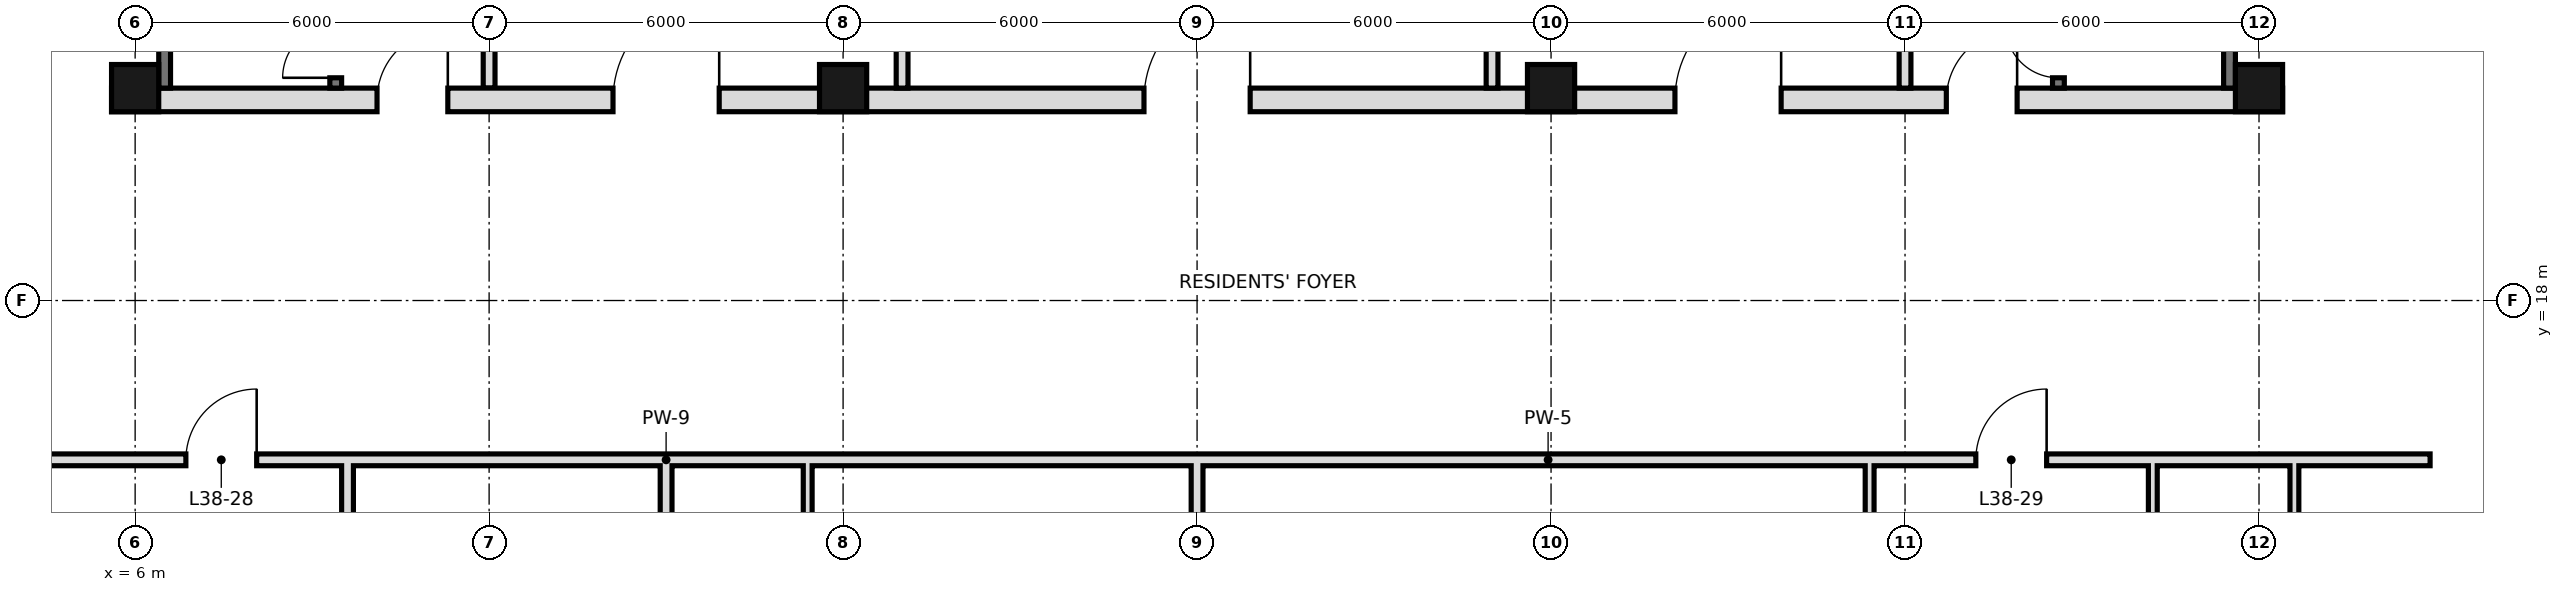
"""IFC4 building model, lengths in metres.
Left out: names, types, materials, properties, quantities, classifications, styles, units other than length and angle.
Written with IfcOpenShell. Run it as: python <this file> out.ifc"""

import sys

from ifc_helpers import new_model, si_unit, direction, frame, frame_2d, origin, origin_2d, place, context, subcontext, project, spatial, rectangle, hollow_rectangle, extrude, element, fill, save


model = new_model("IFC4")
c1 = context("Model", 3, precision=1e-05, world=origin(), true_north=direction((0.0, 1.0)))
c2 = subcontext(c1, "Body", "Model", "MODEL_VIEW")
j1 = project(units=[si_unit("LENGTHUNIT", "METRE"), si_unit("PLANEANGLEUNIT", "RADIAN")], contexts=[c1])
p1 = place(None, origin())
s1 = spatial("IfcSite", under=j1, at=p1, CompositionType="ELEMENT")
p2 = place(p1, origin())
s2 = spatial("IfcBuilding", under=s1, at=p2, CompositionType="ELEMENT")
p3 = place(p2, frame((0.0, 0.0, 167.2)))
s3 = spatial("IfcBuildingStorey", under=s2, at=p3, CompositionType="ELEMENT", Elevation=167.2)
for number, where, z_axis, x_axis in (
    (1, (6.0, 21.6, 0.0), (0.0, 0.0, 1.0), (1.0, 0.0, 0.0)),
    (2, (18.0, 21.6, 0.0), (0.0, 0.0, 1.0), (1.0, 0.0, 0.0)),
    (3, (30.0, 21.6, 0.0), (0.0, 0.0, 1.0), (1.0, 0.0, 0.0)),
    (4, (42.0, 21.6, 0.0), (0.0, 0.0, 1.0), (1.0, 0.0, 0.0)),
):
    element("IfcColumn", number, at=place(p3, frame(where, z_axis=z_axis, x_axis=x_axis)), inside=s3, PredefinedType="COLUMN", context=c2, shape_type="SweptSolid", body=[
        extrude(hollow_rectangle(XDim=0.8, YDim=0.8, WallThickness=0.045, at=origin_2d()), origin(), (0.0, 0.0, 1.0), 3.6),
    ])
p4 = place(p3, frame((15.0, 10.8, 0.0), z_axis=(0.0, 0.0, 1.0), x_axis=(0.0, 1.0, 0.0)))
e5 = element("IfcWall", 5, at=p4, inside=s3, PredefinedType="SOLIDWALL", context=c2, shape_type="SweptSolid", body=[
    extrude(rectangle(XDim=4.5, YDim=0.2, at=frame_2d((2.25, 0.0))), origin(), (0.0, 0.0, 1.0), 2.72),
])
p5 = place(p3, frame((17.4, 10.8, 0.0), z_axis=(0.0, 0.0, 1.0), x_axis=(0.0, 1.0, 0.0)))
e6 = element("IfcWall", 6, at=p5, inside=s3, PredefinedType="PARTITIONING", context=c2, shape_type="SweptSolid", body=[
    extrude(rectangle(XDim=4.5, YDim=0.15, at=frame_2d((2.25, 0.0))), origin(), (0.0, 0.0, 1.0), 3.42),
])
p6 = place(p3, frame((24.0, 0.0, 0.0), z_axis=(0.0, 0.0, 1.0), x_axis=(0.0, 1.0, 0.0)))
e7 = element("IfcWall", 7, at=p6, inside=s3, PredefinedType="SOLIDWALL", context=c2, shape_type="SweptSolid", body=[
    extrude(rectangle(XDim=15.3, YDim=0.2, at=frame_2d((7.65, 0.0))), origin(), (0.0, 0.0, 1.0), 2.72),
])
for number, where, z_axis, x_axis in (
    (8, (35.4, 10.8, 0.0), (0.0, 0.0, 1.0), (0.0, 1.0, 0.0)),
    (9, (40.2, 10.8, 0.0), (0.0, 0.0, 1.0), (0.0, 1.0, 0.0)),
    (10, (42.6, 10.8, 0.0), (0.0, 0.0, 1.0), (0.0, 1.0, 0.0)),
):
    element("IfcWall", number, at=place(p3, frame(where, z_axis=z_axis, x_axis=x_axis)), inside=s3, PredefinedType="PARTITIONING", context=c2, shape_type="SweptSolid", body=[
        extrude(rectangle(XDim=4.5, YDim=0.15, at=frame_2d((2.25, 0.0))), origin(), (0.0, 0.0, 1.0), 3.42),
    ])
p7 = place(p3, frame((9.6, 10.8, 0.0), z_axis=(0.0, 0.0, 1.0), x_axis=(0.0, 1.0, 0.0)))
e11 = element("IfcWall", 11, at=p7, inside=s3, PredefinedType="SOLIDWALL", context=c2, shape_type="SweptSolid", body=[
    extrude(rectangle(XDim=4.5, YDim=0.2, at=frame_2d((2.25, 0.0))), origin(), (0.0, 0.0, 1.0), 2.72),
])
p8 = place(p3, frame((3.1, 15.3, 0.0), z_axis=(0.0, 0.0, 1.0), x_axis=(1.0, 0.0, 0.0)))
e12 = element("IfcWall", 12, at=p8, inside=s3, PredefinedType="SOLIDWALL", context=c2, shape_type="SweptSolid", body=[
    extrude(rectangle(XDim=6.5, YDim=0.2, at=frame_2d((3.25, 0.0))), origin(), (0.0, 0.0, 1.0), 2.72),
])
p9 = place(p8, frame((3.76, 0.0, 0.0)))
e13 = element("IfcOpeningElement", 13, at=p9, cuts=e12, PredefinedType="OPENING", context=c2, shape_type="SweptSolid", body=[
    extrude(rectangle(XDim=1.2, YDim=2.4, at=frame_2d((0.6, 1.2))), frame((0.0, 0.11, 0.0), z_axis=(0.0, -1.0, 0.0), x_axis=(1.0, 0.0, 0.0)), (0.0, 0.0, 1.0), 0.22),
])
p10 = place(p3, frame((15.0, 15.3, 0.0), z_axis=(0.0, 0.0, 1.0), x_axis=(1.0, 0.0, 0.0)))
e14 = element("IfcWall", 14, at=p10, inside=s3, PredefinedType="SOLIDWALL", context=c2, shape_type="SweptSolid", body=[
    extrude(rectangle(XDim=29.9, YDim=0.2, at=frame_2d((14.95, 0.0))), origin(), (0.0, 0.0, 1.0), 2.72),
])
p11 = place(p10, frame((22.2, 0.0, 0.0)))
e15 = element("IfcOpeningElement", 15, at=p11, cuts=e14, PredefinedType="OPENING", context=c2, shape_type="SweptSolid", body=[
    extrude(rectangle(XDim=1.2, YDim=2.4, at=frame_2d((0.6, 1.2))), frame((0.0, 0.11, 0.0), z_axis=(0.0, -1.0, 0.0), x_axis=(1.0, 0.0, 0.0)), (0.0, 0.0, 1.0), 0.22),
])
p12 = place(p3, frame((9.6, 15.3, 0.0), z_axis=(0.0, 0.0, 1.0), x_axis=(1.0, 0.0, 0.0)))
e16 = element("IfcWall", 16, at=p12, inside=s3, PredefinedType="SOLIDWALL", context=c2, shape_type="SweptSolid", body=[
    extrude(rectangle(XDim=5.4, YDim=0.2, at=frame_2d((2.7, 0.0))), origin(), (0.0, 0.0, 1.0), 3.42),
])
for number, where, z_axis, x_axis in (
    (17, (6.5, 21.6, 0.0), (0.0, 0.0, 1.0), (0.0, 1.0, 0.0)),
    (18, (41.5, 21.6, 0.0), (0.0, 0.0, 1.0), (0.0, 1.0, 0.0)),
):
    element("IfcWall", number, at=place(p3, frame(where, z_axis=z_axis, x_axis=x_axis)), inside=s3, PredefinedType="SOLIDWALL", context=c2, shape_type="SweptSolid", body=[
        extrude(rectangle(XDim=23.5, YDim=0.2, at=frame_2d((11.75, 0.0))), origin(), (0.0, 0.0, 1.0), 3.42),
    ])
p13 = place(p3, frame((5.6, 21.4, 0.0), z_axis=(0.0, 0.0, 1.0), x_axis=(1.0, 0.0, 0.0)))
e19 = element("IfcWall", 19, at=p13, inside=s3, PredefinedType="SOLIDWALL", context=c2, shape_type="SweptSolid", body=[
    extrude(rectangle(XDim=36.8, YDim=0.4, at=frame_2d((18.4, 0.0))), origin(), (0.0, 0.0, 1.0), 3.42),
])
p14 = place(p13, frame((8.5, 0.0, 0.0)))
e20 = element("IfcOpeningElement", 20, at=p14, cuts=e19, PredefinedType="OPENING", context=c2, shape_type="SweptSolid", body=[
    extrude(rectangle(XDim=1.8, YDim=2.1, at=frame_2d((0.9, 1.05))), frame((0.0, 0.21, 0.0), z_axis=(0.0, -1.0, 0.0), x_axis=(1.0, 0.0, 0.0)), (0.0, 0.0, 1.0), 0.42),
])
p15 = place(p13, frame((17.5, 0.0, 0.0)))
e21 = element("IfcOpeningElement", 21, at=p15, cuts=e19, PredefinedType="OPENING", context=c2, shape_type="SweptSolid", body=[
    extrude(rectangle(XDim=1.8, YDim=2.1, at=frame_2d((0.9, 1.05))), frame((0.0, 0.21, 0.0), z_axis=(0.0, -1.0, 0.0), x_axis=(1.0, 0.0, 0.0)), (0.0, 0.0, 1.0), 0.42),
])
p16 = place(p13, frame((26.5, 0.0, 0.0)))
e22 = element("IfcOpeningElement", 22, at=p16, cuts=e19, PredefinedType="OPENING", context=c2, shape_type="SweptSolid", body=[
    extrude(rectangle(XDim=1.8, YDim=2.1, at=frame_2d((0.9, 1.05))), frame((0.0, 0.21, 0.0), z_axis=(0.0, -1.0, 0.0), x_axis=(1.0, 0.0, 0.0)), (0.0, 0.0, 1.0), 0.42),
])
p17 = place(p13, frame((4.5, 0.0, 0.0)))
e23 = element("IfcOpeningElement", 23, at=p17, cuts=e19, PredefinedType="OPENING", context=c2, shape_type="SweptSolid", body=[
    extrude(rectangle(XDim=1.2, YDim=2.1, at=frame_2d((0.6, 1.05))), frame((0.0, 0.21, 0.0), z_axis=(0.0, -1.0, 0.0), x_axis=(1.0, 0.0, 0.0)), (0.0, 0.0, 1.0), 0.42),
])
p18 = place(p13, frame((31.1, 0.0, 0.0)))
e24 = element("IfcOpeningElement", 24, at=p18, cuts=e19, PredefinedType="OPENING", context=c2, shape_type="SweptSolid", body=[
    extrude(rectangle(XDim=1.2, YDim=2.1, at=frame_2d((0.6, 1.05))), frame((0.0, 0.21, 0.0), z_axis=(0.0, -1.0, 0.0), x_axis=(1.0, 0.0, 0.0)), (0.0, 0.0, 1.0), 0.42),
])
p19 = place(p3, frame((19.0, 21.6, 0.0), z_axis=(0.0, 0.0, 1.0), x_axis=(0.0, 1.0, 0.0)))
e25 = element("IfcWall", 25, at=p19, inside=s3, PredefinedType="PARTITIONING", context=c2, shape_type="SweptSolid", body=[
    extrude(rectangle(XDim=6.0, YDim=0.2, at=frame_2d((3.0, 0.0))), origin(), (0.0, 0.0, 1.0), 3.42),
])
p20 = place(p19, frame((2.1, 0.0, 0.0)))
e26 = element("IfcOpeningElement", 26, at=p20, cuts=e25, PredefinedType="OPENING", context=c2, shape_type="SweptSolid", body=[
    extrude(rectangle(XDim=1.8, YDim=2.1, at=frame_2d((0.9, 1.05))), frame((0.0, 0.11, 0.0), z_axis=(0.0, -1.0, 0.0), x_axis=(1.0, 0.0, 0.0)), (0.0, 0.0, 1.0), 0.22),
])
p21 = place(p3, frame((29.0, 21.6, 0.0), z_axis=(0.0, 0.0, 1.0), x_axis=(0.0, 1.0, 0.0)))
e27 = element("IfcWall", 27, at=p21, inside=s3, PredefinedType="PARTITIONING", context=c2, shape_type="SweptSolid", body=[
    extrude(rectangle(XDim=6.0, YDim=0.2, at=frame_2d((3.0, 0.0))), origin(), (0.0, 0.0, 1.0), 3.42),
])
p22 = place(p21, frame((2.1, 0.0, 0.0)))
e28 = element("IfcOpeningElement", 28, at=p22, cuts=e27, PredefinedType="OPENING", context=c2, shape_type="SweptSolid", body=[
    extrude(rectangle(XDim=1.8, YDim=2.1, at=frame_2d((0.9, 1.05))), frame((0.0, 0.11, 0.0), z_axis=(0.0, -1.0, 0.0), x_axis=(1.0, 0.0, 0.0)), (0.0, 0.0, 1.0), 0.22),
])
for number, where, z_axis, x_axis in (
    (29, (12.0, 21.6, 0.0), (0.0, 0.0, 1.0), (0.0, 1.0, 0.0)),
    (30, (36.0, 21.6, 0.0), (0.0, 0.0, 1.0), (0.0, 1.0, 0.0)),
):
    element("IfcWall", number, at=place(p3, frame(where, z_axis=z_axis, x_axis=x_axis)), inside=s3, PredefinedType="PARTITIONING", context=c2, shape_type="SweptSolid", body=[
        extrude(rectangle(XDim=6.1, YDim=0.2, at=frame_2d((3.05, 0.0))), origin(), (0.0, 0.0, 1.0), 3.42),
    ])
p23 = place(p3, frame((38.6, 21.6, 0.0), z_axis=(0.0, 0.0, 1.0), x_axis=(0.0, 1.0, 0.0)))
e31 = element("IfcWall", 31, at=p23, inside=s3, PredefinedType="SOLIDWALL", context=c2, shape_type="SweptSolid", body=[
    extrude(rectangle(XDim=23.4, YDim=0.2, at=frame_2d((11.7, 0.0))), origin(), (0.0, 0.0, 1.0), 3.42),
])
p24 = place(p23, frame((7.0, 0.0, 0.0)))
e32 = element("IfcOpeningElement", 32, at=p24, cuts=e31, PredefinedType="OPENING", context=c2, shape_type="SweptSolid", body=[
    extrude(rectangle(XDim=1.1, YDim=2.1, at=frame_2d((0.55, 1.05))), frame((0.0, 0.11, 0.0), z_axis=(0.0, -1.0, 0.0), x_axis=(1.0, 0.0, 0.0)), (0.0, 0.0, 1.0), 0.22),
])
p25 = place(p23, frame((10.1, 0.0, 0.0)))
e33 = element("IfcOpeningElement", 33, at=p25, cuts=e31, PredefinedType="OPENING", context=c2, shape_type="SweptSolid", body=[
    extrude(rectangle(XDim=1.1, YDim=2.1, at=frame_2d((0.55, 1.05))), frame((0.0, 0.11, 0.0), z_axis=(0.0, -1.0, 0.0), x_axis=(1.0, 0.0, 0.0)), (0.0, 0.0, 1.0), 0.22),
])
p26 = place(p23, frame((13.2, 0.0, 0.0)))
e34 = element("IfcOpeningElement", 34, at=p26, cuts=e31, PredefinedType="OPENING", context=c2, shape_type="SweptSolid", body=[
    extrude(rectangle(XDim=1.1, YDim=2.1, at=frame_2d((0.55, 1.05))), frame((0.0, 0.11, 0.0), z_axis=(0.0, -1.0, 0.0), x_axis=(1.0, 0.0, 0.0)), (0.0, 0.0, 1.0), 0.22),
])
p27 = place(p23, frame((15.7, 0.0, 0.0)))
e35 = element("IfcOpeningElement", 35, at=p27, cuts=e31, PredefinedType="OPENING", context=c2, shape_type="SweptSolid", body=[
    extrude(rectangle(XDim=1.0, YDim=2.1, at=frame_2d((0.5, 1.05))), frame((0.0, 0.11, 0.0), z_axis=(0.0, -1.0, 0.0), x_axis=(1.0, 0.0, 0.0)), (0.0, 0.0, 1.0), 0.22),
])
p28 = place(p23, frame((0.175, 0.0, 0.0)))
e36 = element("IfcOpeningElement", 36, at=p28, cuts=e31, PredefinedType="OPENING", context=c2, shape_type="SweptSolid", body=[
    extrude(rectangle(XDim=0.9, YDim=2.1, at=frame_2d((0.45, 1.05))), frame((0.0, 0.11, 0.0), z_axis=(0.0, -1.0, 0.0), x_axis=(1.0, 0.0, 0.0)), (0.0, 0.0, 1.0), 0.22),
])
p29 = place(p3, frame((9.4, 21.6, 0.0), z_axis=(0.0, 0.0, 1.0), x_axis=(0.0, 1.0, 0.0)))
e37 = element("IfcWall", 37, at=p29, inside=s3, PredefinedType="SOLIDWALL", context=c2, shape_type="SweptSolid", body=[
    extrude(rectangle(XDim=23.4, YDim=0.2, at=frame_2d((11.7, 0.0))), origin(), (0.0, 0.0, 1.0), 3.42),
])
p30 = place(p29, frame((15.7, 0.0, 0.0)))
e38 = element("IfcOpeningElement", 38, at=p30, cuts=e37, PredefinedType="OPENING", context=c2, shape_type="SweptSolid", body=[
    extrude(rectangle(XDim=1.0, YDim=2.1, at=frame_2d((0.5, 1.05))), frame((0.0, 0.11, 0.0), z_axis=(0.0, -1.0, 0.0), x_axis=(1.0, 0.0, 0.0)), (0.0, 0.0, 1.0), 0.22),
])
p31 = place(p29, frame((0.175, 0.0, 0.0)))
e39 = element("IfcOpeningElement", 39, at=p31, cuts=e37, PredefinedType="OPENING", context=c2, shape_type="SweptSolid", body=[
    extrude(rectangle(XDim=0.9, YDim=2.1, at=frame_2d((0.45, 1.05))), frame((0.0, 0.11, 0.0), z_axis=(0.0, -1.0, 0.0), x_axis=(1.0, 0.0, 0.0)), (0.0, 0.0, 1.0), 0.22),
])
p32 = place(p9, frame((1.2, 0.0, 0.0), z_axis=(0.0, 0.0, 1.0), x_axis=(-1.0, 0.0, 0.0)))
e40 = element("IfcDoor", 40, at=p32, inside=s3, OperationType="SINGLE_SWING_LEFT", PredefinedType="DOOR", context=c2, shape_type="SweptSolid", body=[
    extrude(rectangle(XDim=1.2, YDim=2.4, at=frame_2d((0.6, 1.2))), frame((0.0, 0.025, 0.0), z_axis=(0.0, -1.0, 0.0), x_axis=(1.0, 0.0, 0.0)), (0.0, 0.0, 1.0), 0.05),
])
fill(e13, e40)
p33 = place(p11, frame((1.2, 0.0, 0.0), z_axis=(0.0, 0.0, 1.0), x_axis=(-1.0, 0.0, 0.0)))
e41 = element("IfcDoor", 41, at=p33, inside=s3, OperationType="SINGLE_SWING_LEFT", PredefinedType="DOOR", context=c2, shape_type="SweptSolid", body=[
    extrude(rectangle(XDim=1.2, YDim=2.4, at=frame_2d((0.6, 1.2))), frame((0.0, 0.025, 0.0), z_axis=(0.0, -1.0, 0.0), x_axis=(1.0, 0.0, 0.0)), (0.0, 0.0, 1.0), 0.05),
])
fill(e15, e41)
p34 = place(p14, frame((1.8, 0.0, 0.0), z_axis=(0.0, 0.0, 1.0), x_axis=(-1.0, 0.0, 0.0)))
e42 = element("IfcDoor", 42, at=p34, inside=s3, OperationType="SINGLE_SWING_LEFT", PredefinedType="DOOR", context=c2, shape_type="SweptSolid", body=[
    extrude(rectangle(XDim=1.8, YDim=2.1, at=frame_2d((0.9, 1.05))), frame((0.0, 0.025, 0.0), z_axis=(0.0, -1.0, 0.0), x_axis=(1.0, 0.0, 0.0)), (0.0, 0.0, 1.0), 0.05),
])
fill(e20, e42)
p35 = place(p15, frame((1.8, 0.0, 0.0), z_axis=(0.0, 0.0, 1.0), x_axis=(-1.0, 0.0, 0.0)))
e43 = element("IfcDoor", 43, at=p35, inside=s3, OperationType="SINGLE_SWING_LEFT", PredefinedType="DOOR", context=c2, shape_type="SweptSolid", body=[
    extrude(rectangle(XDim=1.8, YDim=2.1, at=frame_2d((0.9, 1.05))), frame((0.0, 0.025, 0.0), z_axis=(0.0, -1.0, 0.0), x_axis=(1.0, 0.0, 0.0)), (0.0, 0.0, 1.0), 0.05),
])
fill(e21, e43)
p36 = place(p16, frame((1.8, 0.0, 0.0), z_axis=(0.0, 0.0, 1.0), x_axis=(-1.0, 0.0, 0.0)))
e44 = element("IfcDoor", 44, at=p36, inside=s3, OperationType="SINGLE_SWING_LEFT", PredefinedType="DOOR", context=c2, shape_type="SweptSolid", body=[
    extrude(rectangle(XDim=1.8, YDim=2.1, at=frame_2d((0.9, 1.05))), frame((0.0, 0.025, 0.0), z_axis=(0.0, -1.0, 0.0), x_axis=(1.0, 0.0, 0.0)), (0.0, 0.0, 1.0), 0.05),
])
fill(e22, e44)
p37 = place(p17, frame((1.2, 0.0, 0.0), z_axis=(0.0, 0.0, 1.0), x_axis=(-1.0, 0.0, 0.0)))
e45 = element("IfcDoor", 45, at=p37, inside=s3, OperationType="SINGLE_SWING_LEFT", PredefinedType="DOOR", context=c2, shape_type="SweptSolid", body=[
    extrude(rectangle(XDim=1.2, YDim=2.1, at=frame_2d((0.6, 1.05))), frame((0.0, 0.025, 0.0), z_axis=(0.0, -1.0, 0.0), x_axis=(1.0, 0.0, 0.0)), (0.0, 0.0, 1.0), 0.05),
])
fill(e23, e45)
p38 = place(p18, frame((1.2, 0.0, 0.0), z_axis=(0.0, 0.0, 1.0), x_axis=(-1.0, 0.0, 0.0)))
e46 = element("IfcDoor", 46, at=p38, inside=s3, OperationType="SINGLE_SWING_LEFT", PredefinedType="DOOR", context=c2, shape_type="SweptSolid", body=[
    extrude(rectangle(XDim=1.2, YDim=2.1, at=frame_2d((0.6, 1.05))), frame((0.0, 0.025, 0.0), z_axis=(0.0, -1.0, 0.0), x_axis=(1.0, 0.0, 0.0)), (0.0, 0.0, 1.0), 0.05),
])
fill(e24, e46)
p39 = place(p31, origin())
e47 = element("IfcDoor", 47, at=p39, inside=s3, OperationType="SINGLE_SWING_LEFT", PredefinedType="DOOR", context=c2, shape_type="SweptSolid", body=[
    extrude(rectangle(XDim=0.9, YDim=2.1, at=frame_2d((0.45, 1.05))), frame((0.0, 0.025, 0.0), z_axis=(0.0, -1.0, 0.0), x_axis=(1.0, 0.0, 0.0)), (0.0, 0.0, 1.0), 0.05),
])
fill(e39, e47)
p40 = place(p28, frame((0.9, 0.0, 0.0), z_axis=(0.0, 0.0, 1.0), x_axis=(-1.0, 0.0, 0.0)))
e48 = element("IfcDoor", 48, at=p40, inside=s3, OperationType="SINGLE_SWING_LEFT", PredefinedType="DOOR", context=c2, shape_type="SweptSolid", body=[
    extrude(rectangle(XDim=0.9, YDim=2.1, at=frame_2d((0.45, 1.05))), frame((0.0, 0.025, 0.0), z_axis=(0.0, -1.0, 0.0), x_axis=(1.0, 0.0, 0.0)), (0.0, 0.0, 1.0), 0.05),
])
fill(e36, e48)
save(model, sys.argv[1])
